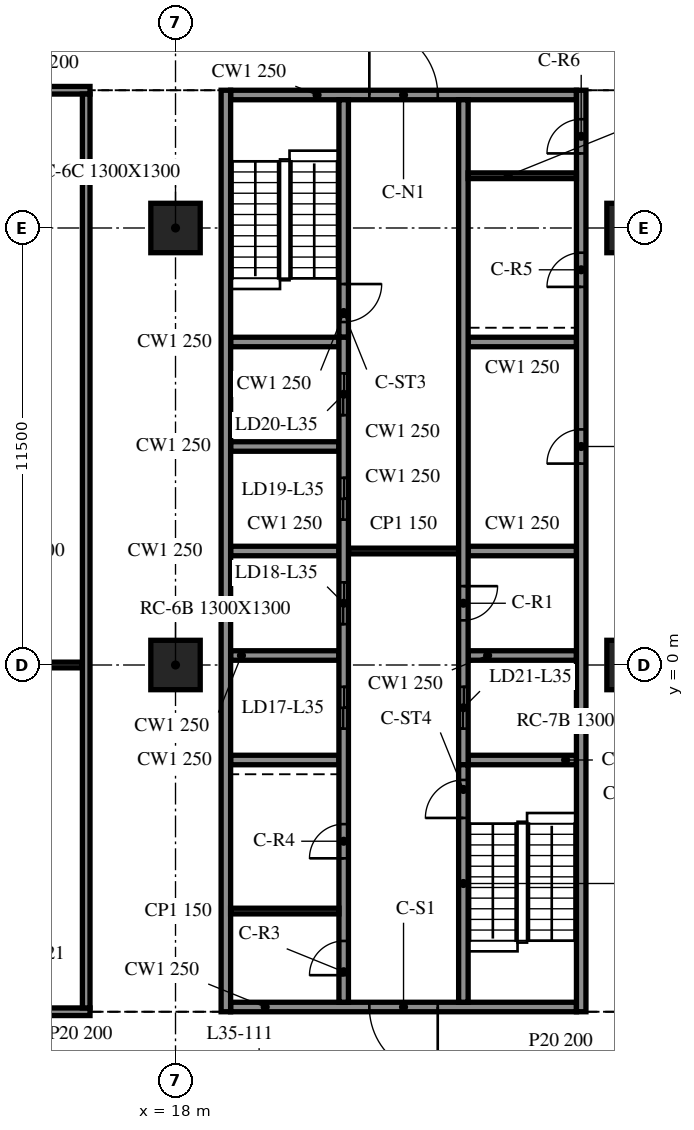
"""IFC4 building model, lengths in metres.
Left out: names, types, materials, properties, quantities, classifications, styles, units other than length and angle.
Written with IfcOpenShell. Run it as: python <this file> out.ifc"""

import sys

from ifc_helpers import new_model, si_unit, direction, frame, frame_2d, origin, origin_2d, place, context, subcontext, project, spatial, rectangle, extrude, element, fill, save


model = new_model("IFC4")
c1 = context("Model", 3, precision=1e-05, world=origin(), true_north=direction((0.0, 1.0)))
c2 = subcontext(c1, "Body", "Model", "MODEL_VIEW")
j1 = project(units=[si_unit("LENGTHUNIT", "METRE"), si_unit("PLANEANGLEUNIT", "RADIAN")], contexts=[c1])
p1 = place(None, origin())
s1 = spatial("IfcSite", under=j1, at=p1, CompositionType="ELEMENT")
p2 = place(p1, origin())
s2 = spatial("IfcBuilding", under=s1, at=p2, CompositionType="ELEMENT")
p3 = place(p2, frame((0.0, 0.0, 150.7)))
s3 = spatial("IfcBuildingStorey", under=s2, at=p3, CompositionType="ELEMENT", Elevation=150.7)
for number, where, z_axis, x_axis in (
    (1, (18.0, 0.0, -0.34), (0.0, 0.0, 1.0), (1.0, 0.0, 0.0)),
    (2, (18.0, 11.5, -0.34), (0.0, 0.0, 1.0), (1.0, 0.0, 0.0)),
    (3, (30.0, 0.0, -0.34), (0.0, 0.0, 1.0), (1.0, 0.0, 0.0)),
    (4, (30.0, 11.5, -0.34), (0.0, 0.0, 1.0), (1.0, 0.0, 0.0)),
):
    element("IfcColumn", number, at=place(p3, frame(where, z_axis=z_axis, x_axis=x_axis)), inside=s3, PredefinedType="COLUMN", context=c2, shape_type="SweptSolid", body=[
        extrude(rectangle(XDim=1.3, YDim=1.3, at=origin_2d()), origin(), (0.0, 0.0, 1.0), 3.89),
    ])
p4 = place(p3, frame((19.325, 15.125, 0.0), z_axis=(0.0, 0.0, 1.0), x_axis=(0.0, -1.0, 0.0)))
e5 = element("IfcWall", 5, at=p4, inside=s3, PredefinedType="SOLIDWALL", context=c2, shape_type="SweptSolid", body=[
    extrude(rectangle(XDim=24.25, YDim=0.25, at=frame_2d((12.125, 0.0))), origin(), (0.0, 0.0, 1.0), 3.55),
])
p5 = place(p3, frame((28.675, -9.125, 0.0), z_axis=(0.0, 0.0, 1.0), x_axis=(0.0, 1.0, 0.0)))
e6 = element("IfcWall", 6, at=p5, inside=s3, PredefinedType="SOLIDWALL", context=c2, shape_type="SweptSolid", body=[
    extrude(rectangle(XDim=24.25, YDim=0.25, at=frame_2d((12.125, 0.0))), origin(), (0.0, 0.0, 1.0), 3.55),
])
p6 = place(p5, frame((14.425, 0.0, 0.0)))
e7 = element("IfcOpeningElement", 7, at=p6, cuts=e6, PredefinedType="OPENING", context=c2, shape_type="SweptSolid", body=[
    extrude(rectangle(XDim=0.9, YDim=2.1, at=frame_2d((0.45, 1.05))), frame((0.0, 0.135, 0.0), z_axis=(0.0, -1.0, 0.0), x_axis=(1.0, 0.0, 0.0)), (0.0, 0.0, 1.0), 0.27),
])
p7 = place(p5, frame((19.075, 0.0, 0.0)))
e8 = element("IfcOpeningElement", 8, at=p7, cuts=e6, PredefinedType="OPENING", context=c2, shape_type="SweptSolid", body=[
    extrude(rectangle(XDim=0.9, YDim=2.1, at=frame_2d((0.45, 1.05))), frame((0.0, 0.135, 0.0), z_axis=(0.0, -1.0, 0.0), x_axis=(1.0, 0.0, 0.0)), (0.0, 0.0, 1.0), 0.27),
])
p8 = place(p5, frame((22.587, 0.0, 0.0)))
e9 = element("IfcOpeningElement", 9, at=p8, cuts=e6, PredefinedType="OPENING", context=c2, shape_type="SweptSolid", body=[
    extrude(rectangle(XDim=0.9, YDim=2.1, at=frame_2d((0.45, 1.05))), frame((0.0, 0.135, 0.0), z_axis=(0.0, -1.0, 0.0), x_axis=(1.0, 0.0, 0.0)), (0.0, 0.0, 1.0), 0.27),
])
p9 = place(p3, frame((28.55, -9.0, 0.0), z_axis=(0.0, 0.0, 1.0), x_axis=(-1.0, 0.0, 0.0)))
e10 = element("IfcWall", 10, at=p9, inside=s3, PredefinedType="SOLIDWALL", context=c2, shape_type="SweptSolid", body=[
    extrude(rectangle(XDim=9.1, YDim=0.25, at=frame_2d((4.55, 0.0))), origin(), (0.0, 0.0, 1.0), 3.55),
])
p10 = place(p9, frame((3.65, 0.0, 0.0)))
e11 = element("IfcOpeningElement", 11, at=p10, cuts=e10, PredefinedType="OPENING", context=c2, shape_type="SweptSolid", body=[
    extrude(rectangle(XDim=1.8, YDim=2.1, at=frame_2d((0.9, 1.05))), frame((0.0, 0.135, 0.0), z_axis=(0.0, -1.0, 0.0), x_axis=(1.0, 0.0, 0.0)), (0.0, 0.0, 1.0), 0.27),
])
p11 = place(p3, frame((19.45, 15.0, 0.0), z_axis=(0.0, 0.0, 1.0), x_axis=(1.0, 0.0, 0.0)))
e12 = element("IfcWall", 12, at=p11, inside=s3, PredefinedType="SOLIDWALL", context=c2, shape_type="SweptSolid", body=[
    extrude(rectangle(XDim=9.1, YDim=0.25, at=frame_2d((4.55, 0.0))), origin(), (0.0, 0.0, 1.0), 3.55),
])
p12 = place(p11, frame((3.65, 0.0, 0.0)))
e13 = element("IfcOpeningElement", 13, at=p12, cuts=e12, PredefinedType="OPENING", context=c2, shape_type="SweptSolid", body=[
    extrude(rectangle(XDim=1.8, YDim=2.1, at=frame_2d((0.9, 1.05))), frame((0.0, 0.135, 0.0), z_axis=(0.0, -1.0, 0.0), x_axis=(1.0, 0.0, 0.0)), (0.0, 0.0, 1.0), 0.27),
])
p13 = place(p3, frame((22.425, -8.875, 0.0), z_axis=(0.0, 0.0, 1.0), x_axis=(0.0, 1.0, 0.0)))
e14 = element("IfcWall", 14, at=p13, inside=s3, PredefinedType="SOLIDWALL", context=c2, shape_type="SweptSolid", body=[
    extrude(rectangle(XDim=17.5, YDim=0.25, at=frame_2d((8.75, 0.0))), origin(), (0.0, 0.0, 1.0), 3.55),
])
p14 = place(p13, frame((7.2, 0.0, 0.0)))
e15 = element("IfcOpeningElement", 15, at=p14, cuts=e14, PredefinedType="OPENING", context=c2, shape_type="SweptSolid", body=[
    extrude(rectangle(XDim=1.1, YDim=2.1, at=frame_2d((0.55, 1.05))), frame((0.0, 0.135, 0.0), z_axis=(0.0, -1.0, 0.0), x_axis=(1.0, 0.0, 0.0)), (0.0, 0.0, 1.0), 0.27),
])
p15 = place(p13, frame((9.95, 0.0, 0.0)))
e16 = element("IfcOpeningElement", 16, at=p15, cuts=e14, PredefinedType="OPENING", context=c2, shape_type="SweptSolid", body=[
    extrude(rectangle(XDim=1.1, YDim=2.1, at=frame_2d((0.55, 1.05))), frame((0.0, 0.135, 0.0), z_axis=(0.0, -1.0, 0.0), x_axis=(1.0, 0.0, 0.0)), (0.0, 0.0, 1.0), 0.27),
])
p16 = place(p13, frame((12.7, 0.0, 0.0)))
e17 = element("IfcOpeningElement", 17, at=p16, cuts=e14, PredefinedType="OPENING", context=c2, shape_type="SweptSolid", body=[
    extrude(rectangle(XDim=1.1, YDim=2.1, at=frame_2d((0.55, 1.05))), frame((0.0, 0.135, 0.0), z_axis=(0.0, -1.0, 0.0), x_axis=(1.0, 0.0, 0.0)), (0.0, 0.0, 1.0), 0.27),
])
p17 = place(p13, frame((15.45, 0.0, 0.0)))
e18 = element("IfcOpeningElement", 18, at=p17, cuts=e14, PredefinedType="OPENING", context=c2, shape_type="SweptSolid", body=[
    extrude(rectangle(XDim=1.1, YDim=2.1, at=frame_2d((0.55, 1.05))), frame((0.0, 0.135, 0.0), z_axis=(0.0, -1.0, 0.0), x_axis=(1.0, 0.0, 0.0)), (0.0, 0.0, 1.0), 0.27),
])
p18 = place(p13, frame((0.712, 0.0, 0.0)))
e19 = element("IfcOpeningElement", 19, at=p18, cuts=e14, PredefinedType="OPENING", context=c2, shape_type="SweptSolid", body=[
    extrude(rectangle(XDim=0.9, YDim=2.1, at=frame_2d((0.45, 1.05))), frame((0.0, 0.135, 0.0), z_axis=(0.0, -1.0, 0.0), x_axis=(1.0, 0.0, 0.0)), (0.0, 0.0, 1.0), 0.27),
])
p19 = place(p13, frame((3.788, 0.0, 0.0)))
e20 = element("IfcOpeningElement", 20, at=p19, cuts=e14, PredefinedType="OPENING", context=c2, shape_type="SweptSolid", body=[
    extrude(rectangle(XDim=0.9, YDim=2.1, at=frame_2d((0.45, 1.05))), frame((0.0, 0.135, 0.0), z_axis=(0.0, -1.0, 0.0), x_axis=(1.0, 0.0, 0.0)), (0.0, 0.0, 1.0), 0.27),
])
p20 = place(p3, frame((22.425, 14.875, 0.0), z_axis=(0.0, 0.0, 1.0), x_axis=(0.0, -1.0, 0.0)))
e21 = element("IfcWall", 21, at=p20, inside=s3, PredefinedType="SOLIDWALL", context=c2, shape_type="SweptSolid", body=[
    extrude(rectangle(XDim=6.25, YDim=0.25, at=frame_2d((3.125, 0.0))), origin(), (0.0, 0.0, 1.0), 3.55),
])
p21 = place(p20, frame((4.85, 0.0, 0.0)))
e22 = element("IfcOpeningElement", 22, at=p21, cuts=e21, PredefinedType="OPENING", context=c2, shape_type="SweptSolid", body=[
    extrude(rectangle(XDim=1.0, YDim=2.1, at=frame_2d((0.5, 1.05))), frame((0.0, 0.135, 0.0), z_axis=(0.0, -1.0, 0.0), x_axis=(1.0, 0.0, 0.0)), (0.0, 0.0, 1.0), 0.27),
])
p22 = place(p3, frame((25.575, -8.875, 0.0), z_axis=(0.0, 0.0, 1.0), x_axis=(0.0, 1.0, 0.0)))
e23 = element("IfcWall", 23, at=p22, inside=s3, PredefinedType="SOLIDWALL", context=c2, shape_type="SweptSolid", body=[
    extrude(rectangle(XDim=6.25, YDim=0.25, at=frame_2d((3.125, 0.0))), origin(), (0.0, 0.0, 1.0), 3.55),
])
p23 = place(p22, frame((4.85, 0.0, 0.0)))
e24 = element("IfcOpeningElement", 24, at=p23, cuts=e23, PredefinedType="OPENING", context=c2, shape_type="SweptSolid", body=[
    extrude(rectangle(XDim=1.0, YDim=2.1, at=frame_2d((0.5, 1.05))), frame((0.0, 0.135, 0.0), z_axis=(0.0, -1.0, 0.0), x_axis=(1.0, 0.0, 0.0)), (0.0, 0.0, 1.0), 0.27),
])
p24 = place(p3, frame((25.575, 14.875, 0.0), z_axis=(0.0, 0.0, 1.0), x_axis=(0.0, -1.0, 0.0)))
e25 = element("IfcWall", 25, at=p24, inside=s3, PredefinedType="SOLIDWALL", context=c2, shape_type="SweptSolid", body=[
    extrude(rectangle(XDim=17.5, YDim=0.25, at=frame_2d((8.75, 0.0))), origin(), (0.0, 0.0, 1.0), 3.55),
])
p25 = place(p24, frame((15.45, 0.0, 0.0)))
e26 = element("IfcOpeningElement", 26, at=p25, cuts=e25, PredefinedType="OPENING", context=c2, shape_type="SweptSolid", body=[
    extrude(rectangle(XDim=1.1, YDim=2.1, at=frame_2d((0.55, 1.05))), frame((0.0, 0.135, 0.0), z_axis=(0.0, -1.0, 0.0), x_axis=(1.0, 0.0, 0.0)), (0.0, 0.0, 1.0), 0.27),
])
p26 = place(p24, frame((12.8, 0.0, 0.0)))
e27 = element("IfcOpeningElement", 27, at=p26, cuts=e25, PredefinedType="OPENING", context=c2, shape_type="SweptSolid", body=[
    extrude(rectangle(XDim=0.9, YDim=2.1, at=frame_2d((0.45, 1.05))), frame((0.0, 0.135, 0.0), z_axis=(0.0, -1.0, 0.0), x_axis=(1.0, 0.0, 0.0)), (0.0, 0.0, 1.0), 0.27),
])
for number, where, z_axis, x_axis in (
    (28, (19.45, -2.5, 0.0), (0.0, 0.0, 1.0), (1.0, 0.0, 0.0)),
    (29, (19.45, 0.25, 0.0), (0.0, 0.0, 1.0), (1.0, 0.0, 0.0)),
    (30, (19.45, 3.0, 0.0), (0.0, 0.0, 1.0), (1.0, 0.0, 0.0)),
    (31, (19.45, 5.75, 0.0), (0.0, 0.0, 1.0), (1.0, 0.0, 0.0)),
    (32, (19.45, 8.5, 0.0), (0.0, 0.0, 1.0), (1.0, 0.0, 0.0)),
    (33, (25.7, -2.5, 0.0), (0.0, 0.0, 1.0), (1.0, 0.0, 0.0)),
    (34, (25.7, 0.25, 0.0), (0.0, 0.0, 1.0), (1.0, 0.0, 0.0)),
    (35, (25.7, 3.0, 0.0), (0.0, 0.0, 1.0), (1.0, 0.0, 0.0)),
    (36, (25.7, 8.5, 0.0), (0.0, 0.0, 1.0), (1.0, 0.0, 0.0)),
):
    element("IfcWall", number, at=place(p3, frame(where, z_axis=z_axis, x_axis=x_axis)), inside=s3, PredefinedType="SOLIDWALL", context=c2, shape_type="SweptSolid", body=[
        extrude(rectangle(XDim=2.85, YDim=0.25, at=frame_2d((1.425, 0.0))), origin(), (0.0, 0.0, 1.0), 3.55),
    ])
p27 = place(p3, frame((22.55, 3.0, 0.0), z_axis=(0.0, 0.0, 1.0), x_axis=(1.0, 0.0, 0.0)))
e37 = element("IfcWall", 37, at=p27, inside=s3, PredefinedType="PARTITIONING", context=c2, shape_type="SweptSolid", body=[
    extrude(rectangle(XDim=2.9, YDim=0.15, at=frame_2d((1.45, 0.0))), origin(), (0.0, 0.0, 1.0), 3.55),
])
for number, where, z_axis, x_axis in (
    (38, (19.45, -6.475, 0.0), (0.0, 0.0, 1.0), (1.0, 0.0, 0.0)),
    (39, (25.7, 12.875, 0.0), (0.0, 0.0, 1.0), (1.0, 0.0, 0.0)),
):
    element("IfcWall", number, at=place(p3, frame(where, z_axis=z_axis, x_axis=x_axis)), inside=s3, PredefinedType="PARTITIONING", context=c2, shape_type="SweptSolid", body=[
        extrude(rectangle(XDim=2.85, YDim=0.15, at=frame_2d((1.425, 0.0))), origin(), (0.0, 0.0, 1.0), 3.55),
    ])
p28 = place(p3, frame((8.15, -9.125, 0.0), z_axis=(0.0, 0.0, 1.0), x_axis=(1.0, 0.0, 0.0)))
e40 = element("IfcWall", 40, at=p28, inside=s3, PredefinedType="PARTITIONING", context=c2, shape_type="SweptSolid", body=[
    extrude(rectangle(XDim=7.6, YDim=0.2, at=frame_2d((3.8, 0.0))), origin(), (0.0, 0.0, 1.0), 3.55),
])
p29 = place(p28, frame((3.3, 0.0, 0.0)))
e41 = element("IfcOpeningElement", 41, at=p29, cuts=e40, PredefinedType="OPENING", context=c2, shape_type="SweptSolid", body=[
    extrude(rectangle(XDim=1.0, YDim=2.1, at=frame_2d((0.5, 1.05))), frame((0.0, 0.11, 0.0), z_axis=(0.0, -1.0, 0.0), x_axis=(1.0, 0.0, 0.0)), (0.0, 0.0, 1.0), 0.22),
])
p30 = place(p3, frame((8.35, 0.0, 0.0), z_axis=(0.0, 0.0, 1.0), x_axis=(1.0, 0.0, 0.0)))
e42 = element("IfcWall", 42, at=p30, inside=s3, PredefinedType="PARTITIONING", context=c2, shape_type="SweptSolid", body=[
    extrude(rectangle(XDim=7.2, YDim=0.15, at=frame_2d((3.6, 0.0))), origin(), (0.0, 0.0, 1.0), 3.55),
])
p31 = place(p3, frame((8.15, 15.125, 0.0), z_axis=(0.0, 0.0, 1.0), x_axis=(1.0, 0.0, 0.0)))
e43 = element("IfcWall", 43, at=p31, inside=s3, PredefinedType="PARTITIONING", context=c2, shape_type="SweptSolid", body=[
    extrude(rectangle(XDim=7.6, YDim=0.2, at=frame_2d((3.8, 0.0))), origin(), (0.0, 0.0, 1.0), 3.55),
])
p32 = place(p31, frame((3.3, 0.0, 0.0)))
e44 = element("IfcOpeningElement", 44, at=p32, cuts=e43, PredefinedType="OPENING", context=c2, shape_type="SweptSolid", body=[
    extrude(rectangle(XDim=0.9, YDim=2.1, at=frame_2d((0.45, 1.05))), frame((0.0, 0.11, 0.0), z_axis=(0.0, -1.0, 0.0), x_axis=(1.0, 0.0, 0.0)), (0.0, 0.0, 1.0), 0.22),
])
p33 = place(p3, frame((15.65, -9.025, 0.0), z_axis=(0.0, 0.0, 1.0), x_axis=(0.0, 1.0, 0.0)))
e45 = element("IfcWall", 45, at=p33, inside=s3, PredefinedType="PARTITIONING", context=c2, shape_type="SweptSolid", body=[
    extrude(rectangle(XDim=24.05, YDim=0.2, at=frame_2d((12.025, 0.0))), origin(), (0.0, 0.0, 1.0), 3.55),
])
p34 = place(p10, origin())
e46 = element("IfcDoor", 46, at=p34, inside=s3, OperationType="DOUBLE_DOOR_SINGLE_SWING", PredefinedType="DOOR", context=c2, shape_type="SweptSolid", body=[
    extrude(rectangle(XDim=1.8, YDim=2.1, at=frame_2d((0.9, 1.05))), frame((0.0, 0.025, 0.0), z_axis=(0.0, -1.0, 0.0), x_axis=(1.0, 0.0, 0.0)), (0.0, 0.0, 1.0), 0.05),
])
fill(e11, e46)
p35 = place(p12, origin())
e47 = element("IfcDoor", 47, at=p35, inside=s3, OperationType="DOUBLE_DOOR_SINGLE_SWING", PredefinedType="DOOR", context=c2, shape_type="SweptSolid", body=[
    extrude(rectangle(XDim=1.8, YDim=2.1, at=frame_2d((0.9, 1.05))), frame((0.0, 0.025, 0.0), z_axis=(0.0, -1.0, 0.0), x_axis=(1.0, 0.0, 0.0)), (0.0, 0.0, 1.0), 0.05),
])
fill(e13, e47)
p36 = place(p25, origin())
e48 = element("IfcDoor", 48, at=p36, inside=s3, OperationType="DOUBLE_DOOR_SLIDING", PredefinedType="DOOR", context=c2, shape_type="SweptSolid", body=[
    extrude(rectangle(XDim=1.1, YDim=2.1, at=frame_2d((0.55, 1.05))), frame((0.0, 0.025, 0.0), z_axis=(0.0, -1.0, 0.0), x_axis=(1.0, 0.0, 0.0)), (0.0, 0.0, 1.0), 0.05),
])
fill(e26, e48)
p37 = place(p14, origin())
e49 = element("IfcDoor", 49, at=p37, inside=s3, OperationType="DOUBLE_DOOR_SLIDING", PredefinedType="DOOR", context=c2, shape_type="SweptSolid", body=[
    extrude(rectangle(XDim=1.1, YDim=2.1, at=frame_2d((0.55, 1.05))), frame((0.0, 0.025, 0.0), z_axis=(0.0, -1.0, 0.0), x_axis=(1.0, 0.0, 0.0)), (0.0, 0.0, 1.0), 0.05),
])
fill(e15, e49)
p38 = place(p15, origin())
e50 = element("IfcDoor", 50, at=p38, inside=s3, OperationType="DOUBLE_DOOR_SLIDING", PredefinedType="DOOR", context=c2, shape_type="SweptSolid", body=[
    extrude(rectangle(XDim=1.1, YDim=2.1, at=frame_2d((0.55, 1.05))), frame((0.0, 0.025, 0.0), z_axis=(0.0, -1.0, 0.0), x_axis=(1.0, 0.0, 0.0)), (0.0, 0.0, 1.0), 0.05),
])
fill(e16, e50)
p39 = place(p16, origin())
e51 = element("IfcDoor", 51, at=p39, inside=s3, OperationType="DOUBLE_DOOR_SLIDING", PredefinedType="DOOR", context=c2, shape_type="SweptSolid", body=[
    extrude(rectangle(XDim=1.1, YDim=2.1, at=frame_2d((0.55, 1.05))), frame((0.0, 0.025, 0.0), z_axis=(0.0, -1.0, 0.0), x_axis=(1.0, 0.0, 0.0)), (0.0, 0.0, 1.0), 0.05),
])
fill(e17, e51)
p40 = place(p17, origin())
e52 = element("IfcDoor", 52, at=p40, inside=s3, OperationType="DOUBLE_DOOR_SLIDING", PredefinedType="DOOR", context=c2, shape_type="SweptSolid", body=[
    extrude(rectangle(XDim=1.1, YDim=2.1, at=frame_2d((0.55, 1.05))), frame((0.0, 0.025, 0.0), z_axis=(0.0, -1.0, 0.0), x_axis=(1.0, 0.0, 0.0)), (0.0, 0.0, 1.0), 0.05),
])
fill(e18, e52)
p41 = place(p26, origin())
e53 = element("IfcDoor", 53, at=p41, inside=s3, OperationType="SINGLE_SWING_LEFT", PredefinedType="DOOR", context=c2, shape_type="SweptSolid", body=[
    extrude(rectangle(XDim=0.9, YDim=2.1, at=frame_2d((0.45, 1.05))), frame((0.0, 0.025, 0.0), z_axis=(0.0, -1.0, 0.0), x_axis=(1.0, 0.0, 0.0)), (0.0, 0.0, 1.0), 0.05),
])
fill(e27, e53)
p42 = place(p6, origin())
e54 = element("IfcDoor", 54, at=p42, inside=s3, OperationType="SINGLE_SWING_RIGHT", PredefinedType="DOOR", context=c2, shape_type="SweptSolid", body=[
    extrude(rectangle(XDim=0.9, YDim=2.1, at=frame_2d((0.45, 1.05))), frame((0.0, 0.025, 0.0), z_axis=(0.0, -1.0, 0.0), x_axis=(1.0, 0.0, 0.0)), (0.0, 0.0, 1.0), 0.05),
])
fill(e7, e54)
p43 = place(p18, origin())
e55 = element("IfcDoor", 55, at=p43, inside=s3, OperationType="SINGLE_SWING_LEFT", PredefinedType="DOOR", context=c2, shape_type="SweptSolid", body=[
    extrude(rectangle(XDim=0.9, YDim=2.1, at=frame_2d((0.45, 1.05))), frame((0.0, 0.025, 0.0), z_axis=(0.0, -1.0, 0.0), x_axis=(1.0, 0.0, 0.0)), (0.0, 0.0, 1.0), 0.05),
])
fill(e19, e55)
p44 = place(p19, origin())
e56 = element("IfcDoor", 56, at=p44, inside=s3, OperationType="SINGLE_SWING_RIGHT", PredefinedType="DOOR", context=c2, shape_type="SweptSolid", body=[
    extrude(rectangle(XDim=0.9, YDim=2.1, at=frame_2d((0.45, 1.05))), frame((0.0, 0.025, 0.0), z_axis=(0.0, -1.0, 0.0), x_axis=(1.0, 0.0, 0.0)), (0.0, 0.0, 1.0), 0.05),
])
fill(e20, e56)
p45 = place(p7, origin())
e57 = element("IfcDoor", 57, at=p45, inside=s3, OperationType="SINGLE_SWING_LEFT", PredefinedType="DOOR", context=c2, shape_type="SweptSolid", body=[
    extrude(rectangle(XDim=0.9, YDim=2.1, at=frame_2d((0.45, 1.05))), frame((0.0, 0.025, 0.0), z_axis=(0.0, -1.0, 0.0), x_axis=(1.0, 0.0, 0.0)), (0.0, 0.0, 1.0), 0.05),
])
fill(e8, e57)
p46 = place(p8, origin())
e58 = element("IfcDoor", 58, at=p46, inside=s3, OperationType="SINGLE_SWING_RIGHT", PredefinedType="DOOR", context=c2, shape_type="SweptSolid", body=[
    extrude(rectangle(XDim=0.9, YDim=2.1, at=frame_2d((0.45, 1.05))), frame((0.0, 0.025, 0.0), z_axis=(0.0, -1.0, 0.0), x_axis=(1.0, 0.0, 0.0)), (0.0, 0.0, 1.0), 0.05),
])
fill(e9, e58)
p47 = place(p21, origin())
e59 = element("IfcDoor", 59, at=p47, inside=s3, OperationType="SINGLE_SWING_LEFT", PredefinedType="DOOR", context=c2, shape_type="SweptSolid", body=[
    extrude(rectangle(XDim=1.0, YDim=2.1, at=frame_2d((0.5, 1.05))), frame((0.0, 0.025, 0.0), z_axis=(0.0, -1.0, 0.0), x_axis=(1.0, 0.0, 0.0)), (0.0, 0.0, 1.0), 0.05),
])
fill(e22, e59)
p48 = place(p23, origin())
e60 = element("IfcDoor", 60, at=p48, inside=s3, OperationType="SINGLE_SWING_RIGHT", PredefinedType="DOOR", context=c2, shape_type="SweptSolid", body=[
    extrude(rectangle(XDim=1.0, YDim=2.1, at=frame_2d((0.5, 1.05))), frame((0.0, 0.025, 0.0), z_axis=(0.0, -1.0, 0.0), x_axis=(1.0, 0.0, 0.0)), (0.0, 0.0, 1.0), 0.05),
])
fill(e24, e60)
save(model, sys.argv[1])
